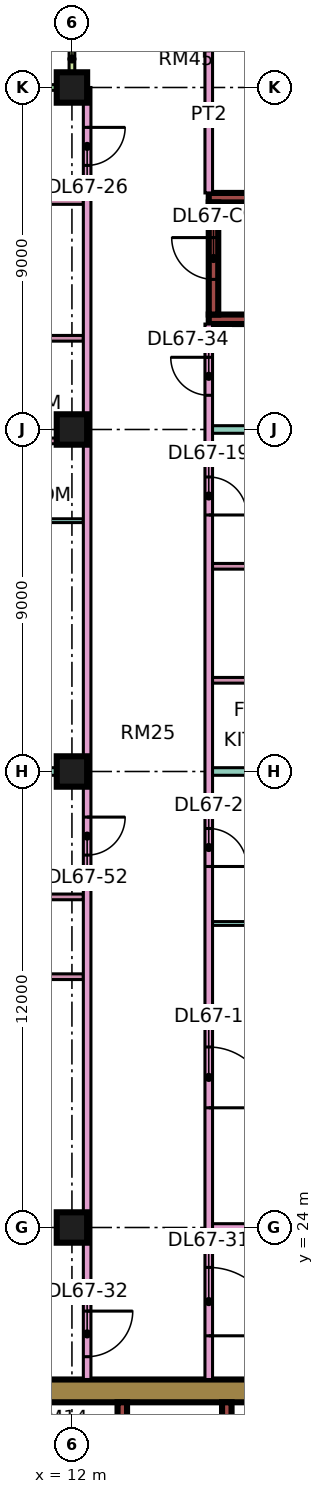
"""IFC4 building model, lengths in metres.
Left out: names, types, materials, properties, quantities, classifications, styles, units other than length and angle.
Written with IfcOpenShell. Run it as: python <this file> out.ifc"""

import sys

from ifc_helpers import new_model, si_unit, direction, frame, frame_2d, origin, origin_2d, place, context, subcontext, project, spatial, rectangle, extrude, element, fill, save


model = new_model("IFC4")
c1 = context("Model", 3, precision=1e-05, world=origin(), true_north=direction((0.0, 1.0)))
c2 = subcontext(c1, "Body", "Model", "MODEL_VIEW")
j1 = project(units=[si_unit("LENGTHUNIT", "METRE"), si_unit("PLANEANGLEUNIT", "RADIAN")], contexts=[c1])
p1 = place(None, origin())
s1 = spatial("IfcSite", under=j1, at=p1, CompositionType="ELEMENT")
p2 = place(p1, origin())
s2 = spatial("IfcBuilding", under=s1, at=p2, CompositionType="ELEMENT")
p3 = place(p2, frame((0.0, 0.0, 288.4)))
s3 = spatial("IfcBuildingStorey", under=s2, at=p3, CompositionType="ELEMENT", Elevation=288.4)
for number, where, z_axis, x_axis in (
    (1, (12.0, 24.0, 0.0), (0.0, 0.0, 1.0), (1.0, 0.0, 0.0)),
    (2, (12.0, 36.0, 0.0), (0.0, 0.0, 1.0), (1.0, 0.0, 0.0)),
    (3, (12.0, 45.0, 0.0), (0.0, 0.0, 1.0), (1.0, 0.0, 0.0)),
    (4, (12.0, 54.0, 0.0), (0.0, 0.0, 1.0), (1.0, 0.0, 0.0)),
):
    element("IfcColumn", number, at=place(p3, frame(where, z_axis=z_axis, x_axis=x_axis)), inside=s3, PredefinedType="COLUMN", context=c2, shape_type="SweptSolid", body=[
        extrude(rectangle(XDim=0.8, YDim=0.8, at=origin_2d()), origin(), (0.0, 0.0, 1.0), 3.75),
    ])
p4 = place(p3, frame((9.0, 19.7, 0.0), z_axis=(0.0, 0.0, 1.0), x_axis=(1.0, 0.0, 0.0)))
e5 = element("IfcWall", 5, at=p4, inside=s3, PredefinedType="SHEAR", context=c2, shape_type="SweptSolid", body=[
    extrude(rectangle(XDim=25.0, YDim=0.6, at=frame_2d((12.5, 0.0))), origin(), (0.0, 0.0, 1.0), 3.75),
])
p5 = place(p4, frame((19.1, 0.0, 0.0)))
e6 = element("IfcOpeningElement", 6, at=p5, cuts=e5, PredefinedType="OPENING", context=c2, shape_type="SweptSolid", body=[
    extrude(rectangle(XDim=1.8, YDim=2.4, at=frame_2d((0.9, 1.2))), frame((0.0, 0.31, 0.0), z_axis=(0.0, -1.0, 0.0), x_axis=(1.0, 0.0, 0.0)), (0.0, 0.0, 1.0), 0.62),
])
p6 = place(p3, frame((13.325, 7.6, 0.0), z_axis=(0.0, 0.0, 1.0), x_axis=(0.0, 1.0, 0.0)))
e7 = element("IfcWall", 7, at=p6, inside=s3, PredefinedType="SHEAR", context=c2, shape_type="SweptSolid", body=[
    extrude(rectangle(XDim=11.8, YDim=0.25, at=frame_2d((5.9, 0.0))), origin(), (0.0, 0.0, 1.0), 3.75),
])
p7 = place(p3, frame((16.075, 15.8, 0.0), z_axis=(0.0, 0.0, 1.0), x_axis=(0.0, 1.0, 0.0)))
e8 = element("IfcWall", 8, at=p7, inside=s3, PredefinedType="SHEAR", context=c2, shape_type="SweptSolid", body=[
    extrude(rectangle(XDim=3.6, YDim=0.25, at=frame_2d((1.8, 0.0))), origin(), (0.0, 0.0, 1.0), 3.75),
])
for number, where, z_axis, x_axis in (
    (9, (15.6, 47.9, 0.0), (0.0, 0.0, 1.0), (1.0, 0.0, 0.0)),
    (10, (15.6, 51.1, 0.0), (0.0, 0.0, 1.0), (1.0, 0.0, 0.0)),
):
    element("IfcWall", number, at=place(p3, frame(where, z_axis=z_axis, x_axis=x_axis)), inside=s3, PredefinedType="SHEAR", context=c2, shape_type="SweptSolid", body=[
        extrude(rectangle(XDim=7.0, YDim=0.25, at=frame_2d((3.5, 0.0))), origin(), (0.0, 0.0, 1.0), 3.75),
    ])
p8 = place(p3, frame((15.725, 48.025, 0.0), z_axis=(0.0, 0.0, 1.0), x_axis=(0.0, 1.0, 0.0)))
e11 = element("IfcWall", 11, at=p8, inside=s3, PredefinedType="SHEAR", context=c2, shape_type="SweptSolid", body=[
    extrude(rectangle(XDim=2.95, YDim=0.25, at=frame_2d((1.475, 0.0))), origin(), (0.0, 0.0, 1.0), 3.75),
])
p9 = place(p8, frame((0.925, 0.0, 0.0)))
e12 = element("IfcOpeningElement", 12, at=p9, cuts=e11, PredefinedType="OPENING", context=c2, shape_type="SweptSolid", body=[
    extrude(rectangle(XDim=1.1, YDim=2.2, at=frame_2d((0.55, 1.1))), frame((0.0, 0.135, 0.0), z_axis=(0.0, -1.0, 0.0), x_axis=(1.0, 0.0, 0.0)), (0.0, 0.0, 1.0), 0.27),
])
p10 = place(p3, frame((11.925, 54.0, 0.0), z_axis=(0.0, 0.0, 1.0), x_axis=(-1.0, 0.0, 0.0)))
e13 = element("IfcWall", 13, at=p10, inside=s3, PredefinedType="SOLIDWALL", context=c2, shape_type="SweptSolid", body=[
    extrude(rectangle(XDim=10.35, YDim=0.15, at=frame_2d((5.175, 0.0))), origin(), (0.0, 0.0, 1.0), 3.35),
])
p11 = place(p10, frame((4.488, 0.0, 0.0)))
e14 = element("IfcOpeningElement", 14, at=p11, cuts=e13, PredefinedType="OPENING", context=c2, shape_type="SweptSolid", body=[
    extrude(rectangle(XDim=1.8, YDim=2.4, at=frame_2d((0.9, 1.2))), frame((0.0, 0.085, 0.0), z_axis=(0.0, -1.0, 0.0), x_axis=(1.0, 0.0, 0.0)), (0.0, 0.0, 1.0), 0.17),
])
p12 = place(p3, frame((12.0, 55.5, 0.0), z_axis=(0.0, 0.0, 1.0), x_axis=(0.0, -1.0, 0.0)))
e15 = element("IfcWall", 15, at=p12, inside=s3, PredefinedType="SOLIDWALL", context=c2, shape_type="SweptSolid", body=[
    extrude(rectangle(XDim=1.5, YDim=0.15, at=frame_2d((0.75, 0.0))), origin(), (0.0, 0.0, 1.0), 3.35),
])
p13 = place(p3, frame((-1.35, 22.4, 0.0), z_axis=(0.0, 0.0, 1.0), x_axis=(1.0, 0.0, 0.0)))
e16 = element("IfcWall", 16, at=p13, inside=s3, PredefinedType="PARTITIONING", context=c2, shape_type="SweptSolid", body=[
    extrude(rectangle(XDim=13.65, YDim=0.2, at=frame_2d((6.825, 0.0))), origin(), (0.0, 0.0, 1.0), 3.35),
])
p14 = place(p3, frame((0.0, 36.0, 0.0), z_axis=(0.0, 0.0, 1.0), x_axis=(1.0, 0.0, 0.0)))
e17 = element("IfcWall", 17, at=p14, inside=s3, PredefinedType="PARTITIONING", context=c2, shape_type="SweptSolid", body=[
    extrude(rectangle(XDim=12.3, YDim=0.2, at=frame_2d((6.15, 0.0))), origin(), (0.0, 0.0, 1.0), 3.35),
])
for number, where, z_axis, x_axis in (
    (18, (7.675, 30.6, 0.0), (0.0, 0.0, 1.0), (1.0, 0.0, 0.0)),
    (19, (7.675, 32.7, 0.0), (0.0, 0.0, 1.0), (1.0, 0.0, 0.0)),
):
    element("IfcWall", number, at=place(p3, frame(where, z_axis=z_axis, x_axis=x_axis)), inside=s3, PredefinedType="PARTITIONING", context=c2, shape_type="SweptSolid", body=[
        extrude(rectangle(XDim=4.625, YDim=0.15, at=frame_2d((2.312, 0.0))), origin(), (0.0, 0.0, 1.0), 3.35),
    ])
p15 = place(p3, frame((7.675, 42.6, 0.0), z_axis=(0.0, 0.0, 1.0), x_axis=(1.0, 0.0, 0.0)))
e20 = element("IfcWall", 20, at=p15, inside=s3, PredefinedType="PARTITIONING", context=c2, shape_type="SweptSolid", body=[
    extrude(rectangle(XDim=4.625, YDim=0.1, at=frame_2d((2.312, 0.0))), origin(), (0.0, 0.0, 1.0), 3.35),
])
for number, where, z_axis, x_axis in (
    (21, (7.675, 44.7, 0.0), (0.0, 0.0, 1.0), (1.0, 0.0, 0.0)),
    (22, (7.675, 47.4, 0.0), (0.0, 0.0, 1.0), (1.0, 0.0, 0.0)),
):
    element("IfcWall", number, at=place(p3, frame(where, z_axis=z_axis, x_axis=x_axis)), inside=s3, PredefinedType="PARTITIONING", context=c2, shape_type="SweptSolid", body=[
        extrude(rectangle(XDim=4.625, YDim=0.15, at=frame_2d((2.312, 0.0))), origin(), (0.0, 0.0, 1.0), 3.35),
    ])
p16 = place(p3, frame((7.675, 51.0, 0.0), z_axis=(0.0, 0.0, 1.0), x_axis=(1.0, 0.0, 0.0)))
e23 = element("IfcWall", 23, at=p16, inside=s3, PredefinedType="PARTITIONING", context=c2, shape_type="SweptSolid", body=[
    extrude(rectangle(XDim=4.625, YDim=0.15, at=frame_2d((2.312, 0.0))), origin(), (0.0, 0.0, 1.0), 3.35),
])
p17 = place(p16, frame((1.875, 0.0, 0.0)))
e24 = element("IfcOpeningElement", 24, at=p17, cuts=e23, PredefinedType="OPENING", context=c2, shape_type="SweptSolid", body=[
    extrude(rectangle(XDim=0.8, YDim=2.1, at=frame_2d((0.4, 1.05))), frame((0.0, 0.085, 0.0), z_axis=(0.0, -1.0, 0.0), x_axis=(1.0, 0.0, 0.0)), (0.0, 0.0, 1.0), 0.17),
])
p18 = place(p3, frame((12.4, 20.0, 0.0), z_axis=(0.0, 0.0, 1.0), x_axis=(0.0, 1.0, 0.0)))
e25 = element("IfcWall", 25, at=p18, inside=s3, PredefinedType="PARTITIONING", context=c2, shape_type="SweptSolid", body=[
    extrude(rectangle(XDim=34.0, YDim=0.2, at=frame_2d((17.0, 0.0))), origin(), (0.0, 0.0, 1.0), 3.35),
])
p19 = place(p18, frame((31.95, 0.0, 0.0)))
e26 = element("IfcOpeningElement", 26, at=p19, cuts=e25, PredefinedType="OPENING", context=c2, shape_type="SweptSolid", body=[
    extrude(rectangle(XDim=1.0, YDim=2.1, at=frame_2d((0.5, 1.05))), frame((0.0, 0.11, 0.0), z_axis=(0.0, -1.0, 0.0), x_axis=(1.0, 0.0, 0.0)), (0.0, 0.0, 1.0), 0.22),
])
p20 = place(p18, frame((0.6, 0.0, 0.0)))
e27 = element("IfcOpeningElement", 27, at=p20, cuts=e25, PredefinedType="OPENING", context=c2, shape_type="SweptSolid", body=[
    extrude(rectangle(XDim=1.2, YDim=2.1, at=frame_2d((0.6, 1.05))), frame((0.0, 0.11, 0.0), z_axis=(0.0, -1.0, 0.0), x_axis=(1.0, 0.0, 0.0)), (0.0, 0.0, 1.0), 0.22),
])
p21 = place(p18, frame((13.8, 0.0, 0.0)))
e28 = element("IfcOpeningElement", 28, at=p21, cuts=e25, PredefinedType="OPENING", context=c2, shape_type="SweptSolid", body=[
    extrude(rectangle(XDim=1.0, YDim=2.1, at=frame_2d((0.5, 1.05))), frame((0.0, 0.11, 0.0), z_axis=(0.0, -1.0, 0.0), x_axis=(1.0, 0.0, 0.0)), (0.0, 0.0, 1.0), 0.22),
])
p22 = place(p3, frame((15.6, 20.0, 0.0), z_axis=(0.0, 0.0, 1.0), x_axis=(0.0, 1.0, 0.0)))
e29 = element("IfcWall", 29, at=p22, inside=s3, PredefinedType="PARTITIONING", context=c2, shape_type="SweptSolid", body=[
    extrude(rectangle(XDim=27.775, YDim=0.2, at=frame_2d((13.887, 0.0))), origin(), (0.0, 0.0, 1.0), 3.35),
])
p23 = place(p22, frame((7.15, 0.0, 0.0)))
e30 = element("IfcOpeningElement", 30, at=p23, cuts=e29, PredefinedType="OPENING", context=c2, shape_type="SweptSolid", body=[
    extrude(rectangle(XDim=1.6, YDim=2.1, at=frame_2d((0.8, 1.05))), frame((0.0, 0.11, 0.0), z_axis=(0.0, -1.0, 0.0), x_axis=(1.0, 0.0, 0.0)), (0.0, 0.0, 1.0), 0.22),
])
p24 = place(p22, frame((13.5, 0.0, 0.0)))
e31 = element("IfcOpeningElement", 31, at=p24, cuts=e29, PredefinedType="OPENING", context=c2, shape_type="SweptSolid", body=[
    extrude(rectangle(XDim=1.0, YDim=2.1, at=frame_2d((0.5, 1.05))), frame((0.0, 0.11, 0.0), z_axis=(0.0, -1.0, 0.0), x_axis=(1.0, 0.0, 0.0)), (0.0, 0.0, 1.0), 0.22),
])
p25 = place(p22, frame((22.75, 0.0, 0.0)))
e32 = element("IfcOpeningElement", 32, at=p25, cuts=e29, PredefinedType="OPENING", context=c2, shape_type="SweptSolid", body=[
    extrude(rectangle(XDim=1.0, YDim=2.1, at=frame_2d((0.5, 1.05))), frame((0.0, 0.11, 0.0), z_axis=(0.0, -1.0, 0.0), x_axis=(1.0, 0.0, 0.0)), (0.0, 0.0, 1.0), 0.22),
])
p26 = place(p22, frame((1.15, 0.0, 0.0)))
e33 = element("IfcOpeningElement", 33, at=p26, cuts=e29, PredefinedType="OPENING", context=c2, shape_type="SweptSolid", body=[
    extrude(rectangle(XDim=1.8, YDim=2.1, at=frame_2d((0.9, 1.05))), frame((0.0, 0.11, 0.0), z_axis=(0.0, -1.0, 0.0), x_axis=(1.0, 0.0, 0.0)), (0.0, 0.0, 1.0), 0.22),
])
p27 = place(p22, frame((25.9, 0.0, 0.0)))
e34 = element("IfcOpeningElement", 34, at=p27, cuts=e29, PredefinedType="OPENING", context=c2, shape_type="SweptSolid", body=[
    extrude(rectangle(XDim=1.0, YDim=2.1, at=frame_2d((0.5, 1.05))), frame((0.0, 0.11, 0.0), z_axis=(0.0, -1.0, 0.0), x_axis=(1.0, 0.0, 0.0)), (0.0, 0.0, 1.0), 0.22),
])
p28 = place(p3, frame((15.6, 51.225, 0.0), z_axis=(0.0, 0.0, 1.0), x_axis=(0.0, 1.0, 0.0)))
e35 = element("IfcWall", 35, at=p28, inside=s3, PredefinedType="PARTITIONING", context=c2, shape_type="SweptSolid", body=[
    extrude(rectangle(XDim=4.125, YDim=0.2, at=frame_2d((2.062, 0.0))), origin(), (0.0, 0.0, 1.0), 3.35),
])
p29 = place(p3, frame((15.7, 24.0, 0.0), z_axis=(0.0, 0.0, 1.0), x_axis=(1.0, 0.0, 0.0)))
e36 = element("IfcWall", 36, at=p29, inside=s3, PredefinedType="PARTITIONING", context=c2, shape_type="SweptSolid", body=[
    extrude(rectangle(XDim=5.8, YDim=0.2, at=frame_2d((2.9, 0.0))), origin(), (0.0, 0.0, 1.0), 3.35),
])
p30 = place(p3, frame((15.7, 32.0, 0.0), z_axis=(0.0, 0.0, 1.0), x_axis=(1.0, 0.0, 0.0)))
e37 = element("IfcWall", 37, at=p30, inside=s3, PredefinedType="PARTITIONING", context=c2, shape_type="SweptSolid", body=[
    extrude(rectangle(XDim=5.8, YDim=0.1, at=frame_2d((2.9, 0.0))), origin(), (0.0, 0.0, 1.0), 3.35),
])
p31 = place(p3, frame((15.7, 36.0, 0.0), z_axis=(0.0, 0.0, 1.0), x_axis=(1.0, 0.0, 0.0)))
e38 = element("IfcWall", 38, at=p31, inside=s3, PredefinedType="PARTITIONING", context=c2, shape_type="SweptSolid", body=[
    extrude(rectangle(XDim=8.3, YDim=0.2, at=frame_2d((4.15, 0.0))), origin(), (0.0, 0.0, 1.0), 3.35),
])
for number, where, z_axis, x_axis in (
    (39, (15.7, 38.4, 0.0), (0.0, 0.0, 1.0), (1.0, 0.0, 0.0)),
    (40, (15.7, 41.4, 0.0), (0.0, 0.0, 1.0), (1.0, 0.0, 0.0)),
):
    element("IfcWall", number, at=place(p3, frame(where, z_axis=z_axis, x_axis=x_axis)), inside=s3, PredefinedType="PARTITIONING", context=c2, shape_type="SweptSolid", body=[
        extrude(rectangle(XDim=2.825, YDim=0.15, at=frame_2d((1.413, 0.0))), origin(), (0.0, 0.0, 1.0), 3.35),
    ])
p32 = place(p3, frame((15.7, 45.0, 0.0), z_axis=(0.0, 0.0, 1.0), x_axis=(1.0, 0.0, 0.0)))
e41 = element("IfcWall", 41, at=p32, inside=s3, PredefinedType="PARTITIONING", context=c2, shape_type="SweptSolid", body=[
    extrude(rectangle(XDim=8.3, YDim=0.2, at=frame_2d((4.15, 0.0))), origin(), (0.0, 0.0, 1.0), 3.35),
])
p33 = place(p9, frame((1.1, 0.0, 0.0), z_axis=(0.0, 0.0, 1.0), x_axis=(-1.0, 0.0, 0.0)))
e42 = element("IfcDoor", 42, at=p33, inside=s3, OperationType="SINGLE_SWING_RIGHT", PredefinedType="DOOR", context=c2, shape_type="SweptSolid", body=[
    extrude(rectangle(XDim=1.1, YDim=2.2, at=frame_2d((0.55, 1.1))), frame((0.0, 0.025, 0.0), z_axis=(0.0, -1.0, 0.0), x_axis=(1.0, 0.0, 0.0)), (0.0, 0.0, 1.0), 0.05),
])
fill(e12, e42)
p34 = place(p23, frame((1.6, 0.0, 0.0), z_axis=(0.0, 0.0, 1.0), x_axis=(-1.0, 0.0, 0.0)))
e43 = element("IfcDoor", 43, at=p34, inside=s3, OperationType="DOUBLE_DOOR_SINGLE_SWING", PredefinedType="DOOR", context=c2, shape_type="SweptSolid", body=[
    extrude(rectangle(XDim=1.6, YDim=2.1, at=frame_2d((0.8, 1.05))), frame((0.0, 0.025, 0.0), z_axis=(0.0, -1.0, 0.0), x_axis=(1.0, 0.0, 0.0)), (0.0, 0.0, 1.0), 0.05),
])
fill(e30, e43)
p35 = place(p24, frame((1.0, 0.0, 0.0), z_axis=(0.0, 0.0, 1.0), x_axis=(-1.0, 0.0, 0.0)))
e44 = element("IfcDoor", 44, at=p35, inside=s3, OperationType="SINGLE_SWING_LEFT", PredefinedType="DOOR", context=c2, shape_type="SweptSolid", body=[
    extrude(rectangle(XDim=1.0, YDim=2.1, at=frame_2d((0.5, 1.05))), frame((0.0, 0.025, 0.0), z_axis=(0.0, -1.0, 0.0), x_axis=(1.0, 0.0, 0.0)), (0.0, 0.0, 1.0), 0.05),
])
fill(e31, e44)
p36 = place(p25, frame((1.0, 0.0, 0.0), z_axis=(0.0, 0.0, 1.0), x_axis=(-1.0, 0.0, 0.0)))
e45 = element("IfcDoor", 45, at=p36, inside=s3, OperationType="SINGLE_SWING_LEFT", PredefinedType="DOOR", context=c2, shape_type="SweptSolid", body=[
    extrude(rectangle(XDim=1.0, YDim=2.1, at=frame_2d((0.5, 1.05))), frame((0.0, 0.025, 0.0), z_axis=(0.0, -1.0, 0.0), x_axis=(1.0, 0.0, 0.0)), (0.0, 0.0, 1.0), 0.05),
])
fill(e32, e45)
p37 = place(p19, origin())
e46 = element("IfcDoor", 46, at=p37, inside=s3, OperationType="SINGLE_SWING_RIGHT", PredefinedType="DOOR", context=c2, shape_type="SweptSolid", body=[
    extrude(rectangle(XDim=1.0, YDim=2.1, at=frame_2d((0.5, 1.05))), frame((0.0, 0.025, 0.0), z_axis=(0.0, -1.0, 0.0), x_axis=(1.0, 0.0, 0.0)), (0.0, 0.0, 1.0), 0.05),
])
fill(e26, e46)
p38 = place(p26, frame((1.8, 0.0, 0.0), z_axis=(0.0, 0.0, 1.0), x_axis=(-1.0, 0.0, 0.0)))
e47 = element("IfcDoor", 47, at=p38, inside=s3, OperationType="DOUBLE_DOOR_SINGLE_SWING", PredefinedType="DOOR", context=c2, shape_type="SweptSolid", body=[
    extrude(rectangle(XDim=1.8, YDim=2.1, at=frame_2d((0.9, 1.05))), frame((0.0, 0.025, 0.0), z_axis=(0.0, -1.0, 0.0), x_axis=(1.0, 0.0, 0.0)), (0.0, 0.0, 1.0), 0.05),
])
fill(e33, e47)
p39 = place(p20, origin())
e48 = element("IfcDoor", 48, at=p39, inside=s3, OperationType="SINGLE_SWING_RIGHT", PredefinedType="DOOR", context=c2, shape_type="SweptSolid", body=[
    extrude(rectangle(XDim=1.2, YDim=2.1, at=frame_2d((0.6, 1.05))), frame((0.0, 0.025, 0.0), z_axis=(0.0, -1.0, 0.0), x_axis=(1.0, 0.0, 0.0)), (0.0, 0.0, 1.0), 0.05),
])
fill(e27, e48)
p40 = place(p27, frame((1.0, 0.0, 0.0), z_axis=(0.0, 0.0, 1.0), x_axis=(-1.0, 0.0, 0.0)))
e49 = element("IfcDoor", 49, at=p40, inside=s3, OperationType="SINGLE_SWING_RIGHT", PredefinedType="DOOR", context=c2, shape_type="SweptSolid", body=[
    extrude(rectangle(XDim=1.0, YDim=2.1, at=frame_2d((0.5, 1.05))), frame((0.0, 0.025, 0.0), z_axis=(0.0, -1.0, 0.0), x_axis=(1.0, 0.0, 0.0)), (0.0, 0.0, 1.0), 0.05),
])
fill(e34, e49)
p41 = place(p21, origin())
e50 = element("IfcDoor", 50, at=p41, inside=s3, OperationType="SINGLE_SWING_RIGHT", PredefinedType="DOOR", context=c2, shape_type="SweptSolid", body=[
    extrude(rectangle(XDim=1.0, YDim=2.1, at=frame_2d((0.5, 1.05))), frame((0.0, 0.025, 0.0), z_axis=(0.0, -1.0, 0.0), x_axis=(1.0, 0.0, 0.0)), (0.0, 0.0, 1.0), 0.05),
])
fill(e28, e50)
save(model, sys.argv[1])
